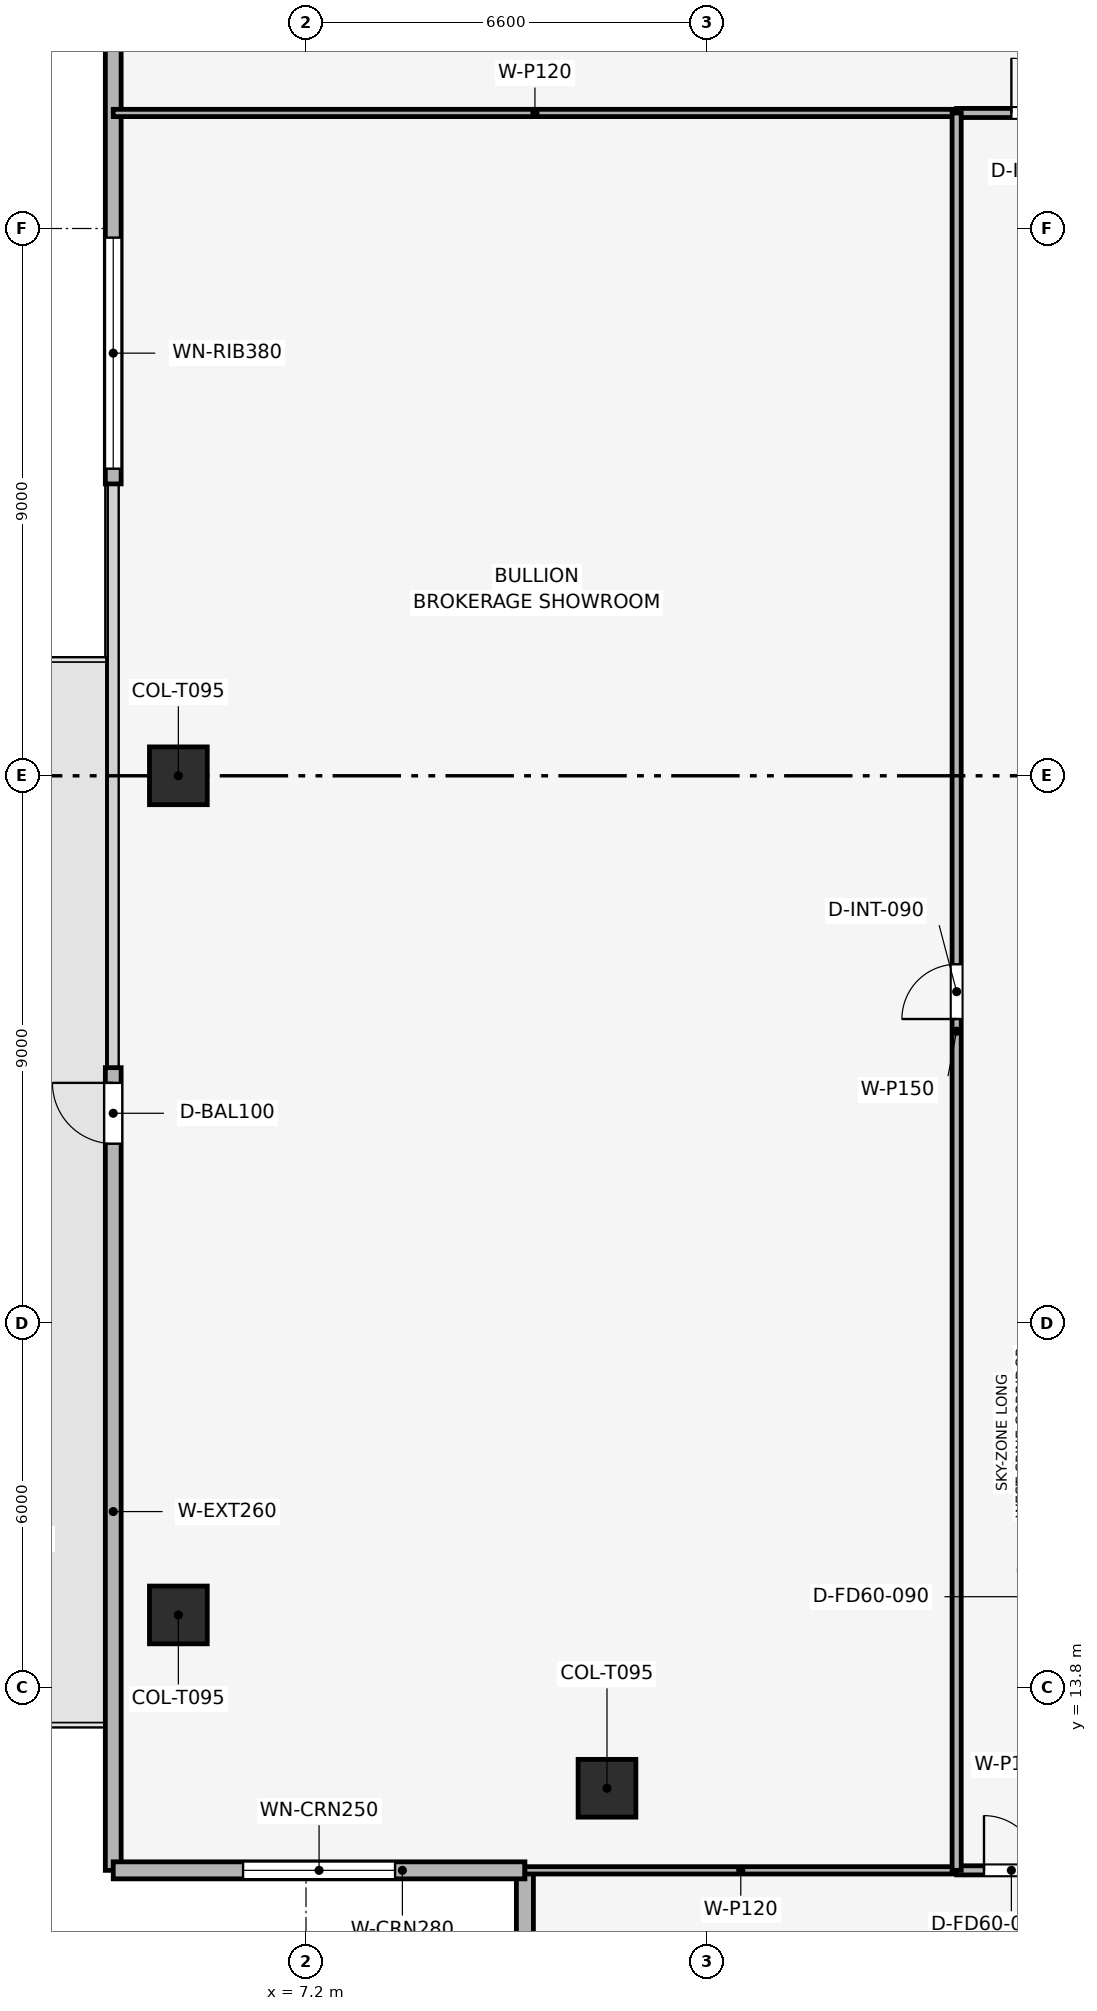
"""IFC4 building model, lengths in metres.
Left out: names, types, materials, properties, quantities, classifications, styles, units other than length and angle.
Written with IfcOpenShell. Run it as: python <this file> out.ifc"""

import sys

from ifc_helpers import new_model, si_unit, direction, frame, frame_2d, origin, origin_2d, place, context, subcontext, project, spatial, rectangle, extrude, element, fill, save


model = new_model("IFC4")
c1 = context("Model", 3, precision=1e-05, world=origin(), true_north=direction((0.0, 1.0)))
c2 = subcontext(c1, "Body", "Model", "MODEL_VIEW")
j1 = project(units=[si_unit("LENGTHUNIT", "METRE"), si_unit("PLANEANGLEUNIT", "RADIAN")], contexts=[c1])
p1 = place(None, origin())
s1 = spatial("IfcSite", under=j1, at=p1, CompositionType="ELEMENT")
p2 = place(p1, origin())
s2 = spatial("IfcBuilding", under=s1, at=p2, CompositionType="ELEMENT")
p3 = place(p2, frame((0.0, 0.0, 280.35)))
s3 = spatial("IfcBuildingStorey", under=s2, at=p3, CompositionType="ELEMENT", Elevation=280.35)
for number, where, z_axis, x_axis in (
    (1, (5.101, 28.8, 0.003), (0.233, 0.0, 0.972), (0.0, 1.0, 0.0)),
    (2, (5.101, 15.0, 0.003), (0.233, 0.0, 0.972), (0.0, 1.0, 0.0)),
):
    element("IfcColumn", number, at=place(p3, frame(where, z_axis=z_axis, x_axis=x_axis)), inside=s3, PredefinedType="COLUMN", context=c2, shape_type="SweptSolid", body=[
        extrude(rectangle(XDim=0.95, YDim=0.95, at=origin_2d()), origin(), (0.0, 0.0, 1.0), 3.48),
    ])
p4 = place(p3, frame((12.15, 12.15, 0.003), z_axis=(0.156204794595, 0.156204794595, 0.975294890939), x_axis=(-0.707106781187, 0.707106781187, 0.0)))
e3 = element("IfcColumn", 3, at=p4, inside=s3, PredefinedType="COLUMN", context=c2, shape_type="SweptSolid", body=[
    extrude(rectangle(XDim=0.95, YDim=0.95, at=origin_2d()), origin(), (0.0, 0.0, 1.0), 3.47),
])
p5 = place(p3, frame((4.03, 10.8, 0.0), z_axis=(0.0, 0.0, 1.0), x_axis=(0.0, 1.0, 0.0)))
e4 = element("IfcWall", 4, at=p5, inside=s3, PredefinedType="SOLIDWALL", context=c2, shape_type="SweptSolid", body=[
    extrude(rectangle(XDim=13.2, YDim=0.26, at=frame_2d((6.6, 0.0))), origin(), (0.0, 0.0, 1.0), 3.39),
])
p6 = place(p5, frame((11.95, 0.0, 0.0)))
e5 = element("IfcOpeningElement", 5, at=p6, cuts=e4, PredefinedType="OPENING", context=c2, shape_type="SweptSolid", body=[
    extrude(rectangle(XDim=1.0, YDim=2.2, at=frame_2d((0.5, 1.1))), frame((0.0, 0.14, 0.0), z_axis=(0.0, -1.0, 0.0), x_axis=(1.0, 0.0, 0.0)), (0.0, 0.0, 1.0), 0.28),
])
p7 = place(p3, frame((4.03, 33.6, 0.0), z_axis=(0.0, 0.0, 1.0), x_axis=(0.0, 1.0, 0.0)))
e6 = element("IfcWall", 6, at=p7, inside=s3, PredefinedType="SOLIDWALL", context=c2, shape_type="SweptSolid", body=[
    extrude(rectangle(XDim=13.2, YDim=0.26, at=frame_2d((6.6, 0.0))), origin(), (0.0, 0.0, 1.0), 3.39),
])
p8 = place(p7, frame((0.25, 0.0, 0.72)))
e7 = element("IfcOpeningElement", 7, at=p8, cuts=e6, PredefinedType="OPENING", context=c2, shape_type="SweptSolid", body=[
    extrude(rectangle(XDim=3.8, YDim=1.9, at=frame_2d((1.9, 0.95))), frame((0.0, 0.14, 0.0), z_axis=(0.0, -1.0, 0.0), x_axis=(1.0, 0.0, 0.0)), (0.0, 0.0, 1.0), 0.28),
])
p9 = place(p3, frame((10.8, 4.03, 0.0), z_axis=(0.0, 0.0, 1.0), x_axis=(0.0, 1.0, 0.0)))
e8 = element("IfcWall", 8, at=p9, inside=s3, PredefinedType="SOLIDWALL", context=c2, shape_type="SweptSolid", body=[
    extrude(rectangle(XDim=6.77, YDim=0.28, at=frame_2d((3.385, 0.0))), origin(), (0.0, 0.0, 1.0), 3.39),
])
p10 = place(p9, frame((2.135, 0.0, 0.72)))
e9 = element("IfcOpeningElement", 9, at=p10, cuts=e8, PredefinedType="OPENING", context=c2, shape_type="SweptSolid", body=[
    extrude(rectangle(XDim=2.5, YDim=1.9, at=frame_2d((1.25, 0.95))), frame((0.0, 0.15, 0.0), z_axis=(0.0, -1.0, 0.0), x_axis=(1.0, 0.0, 0.0)), (0.0, 0.0, 1.0), 0.3),
])
p11 = place(p3, frame((10.8, 10.8, 0.0), z_axis=(0.0, 0.0, 1.0), x_axis=(-1.0, 0.0, 0.0)))
e10 = element("IfcWall", 10, at=p11, inside=s3, PredefinedType="SOLIDWALL", context=c2, shape_type="SweptSolid", body=[
    extrude(rectangle(XDim=6.77, YDim=0.28, at=frame_2d((3.385, 0.0))), origin(), (0.0, 0.0, 1.0), 3.39),
])
p12 = place(p11, frame((2.135, 0.0, 0.72)))
e11 = element("IfcOpeningElement", 11, at=p12, cuts=e10, PredefinedType="OPENING", context=c2, shape_type="SweptSolid", body=[
    extrude(rectangle(XDim=2.5, YDim=1.9, at=frame_2d((1.25, 0.95))), frame((0.0, 0.15, 0.0), z_axis=(0.0, -1.0, 0.0), x_axis=(1.0, 0.0, 0.0)), (0.0, 0.0, 1.0), 0.3),
])
p13 = place(p3, frame((10.8, 10.8, 0.0), z_axis=(0.0, 0.0, 1.0), x_axis=(1.0, 0.0, 0.0)))
e12 = element("IfcWall", 12, at=p13, inside=s3, PredefinedType="PARTITIONING", context=c2, shape_type="SweptSolid", body=[
    extrude(rectangle(XDim=7.1, YDim=0.12, at=frame_2d((3.55, 0.0))), origin(), (0.0, 0.0, 1.0), 2.975),
])
p14 = place(p3, frame((17.9, 10.8, 0.0), z_axis=(0.0, 0.0, 1.0), x_axis=(1.0, 0.0, 0.0)))
e13 = element("IfcWall", 13, at=p14, inside=s3, PredefinedType="PARTITIONING", context=c2, shape_type="SweptSolid", body=[
    extrude(rectangle(XDim=1.9, YDim=0.15, at=frame_2d((0.95, 0.0))), origin(), (0.0, 0.0, 1.0), 3.39),
])
p15 = place(p14, frame((0.45, 0.0, 0.0)))
e14 = element("IfcOpeningElement", 14, at=p15, cuts=e13, PredefinedType="OPENING", context=c2, shape_type="SweptSolid", body=[
    extrude(rectangle(XDim=0.9, YDim=2.1, at=frame_2d((0.45, 1.05))), frame((0.0, 0.085, 0.0), z_axis=(0.0, -1.0, 0.0), x_axis=(1.0, 0.0, 0.0)), (0.0, 0.0, 1.0), 0.17),
])
p16 = place(p3, frame((4.03, 39.7, 0.0), z_axis=(0.0, 0.0, 1.0), x_axis=(1.0, 0.0, 0.0)))
e15 = element("IfcWall", 15, at=p16, inside=s3, PredefinedType="PARTITIONING", context=c2, shape_type="SweptSolid", body=[
    extrude(rectangle(XDim=13.87, YDim=0.12, at=frame_2d((6.935, 0.0))), origin(), (0.0, 0.0, 1.0), 2.975),
])
p17 = place(p3, frame((17.9, 39.7, 0.0), z_axis=(0.0, 0.0, 1.0), x_axis=(1.0, 0.0, 0.0)))
e16 = element("IfcWall", 16, at=p17, inside=s3, PredefinedType="PARTITIONING", context=c2, shape_type="SweptSolid", body=[
    extrude(rectangle(XDim=21.8, YDim=0.15, at=frame_2d((10.9, 0.0))), origin(), (0.0, 0.0, 1.0), 2.975),
])
p18 = place(p17, frame((0.9, 0.0, 0.0)))
e17 = element("IfcOpeningElement", 17, at=p18, cuts=e16, PredefinedType="OPENING", context=c2, shape_type="SweptSolid", body=[
    extrude(rectangle(XDim=0.9, YDim=2.1, at=frame_2d((0.45, 1.05))), frame((0.0, 0.085, 0.0), z_axis=(0.0, -1.0, 0.0), x_axis=(1.0, 0.0, 0.0)), (0.0, 0.0, 1.0), 0.17),
])
p19 = place(p17, frame((3.65, 0.0, 0.0)))
e18 = element("IfcOpeningElement", 18, at=p19, cuts=e16, PredefinedType="OPENING", context=c2, shape_type="SweptSolid", body=[
    extrude(rectangle(XDim=0.9, YDim=2.1, at=frame_2d((0.45, 1.05))), frame((0.0, 0.085, 0.0), z_axis=(0.0, -1.0, 0.0), x_axis=(1.0, 0.0, 0.0)), (0.0, 0.0, 1.0), 0.17),
])
p20 = place(p17, frame((6.55, 0.0, 0.0)))
e19 = element("IfcOpeningElement", 19, at=p20, cuts=e16, PredefinedType="OPENING", context=c2, shape_type="SweptSolid", body=[
    extrude(rectangle(XDim=0.9, YDim=2.1, at=frame_2d((0.45, 1.05))), frame((0.0, 0.085, 0.0), z_axis=(0.0, -1.0, 0.0), x_axis=(1.0, 0.0, 0.0)), (0.0, 0.0, 1.0), 0.17),
])
p21 = place(p17, frame((9.3, 0.0, 0.0)))
e20 = element("IfcOpeningElement", 20, at=p21, cuts=e16, PredefinedType="OPENING", context=c2, shape_type="SweptSolid", body=[
    extrude(rectangle(XDim=0.95, YDim=2.1, at=frame_2d((0.475, 1.05))), frame((0.0, 0.085, 0.0), z_axis=(0.0, -1.0, 0.0), x_axis=(1.0, 0.0, 0.0)), (0.0, 0.0, 1.0), 0.17),
])
p22 = place(p17, frame((16.0, 0.0, 0.0)))
e21 = element("IfcOpeningElement", 21, at=p22, cuts=e16, PredefinedType="OPENING", context=c2, shape_type="SweptSolid", body=[
    extrude(rectangle(XDim=0.9, YDim=2.1, at=frame_2d((0.45, 1.05))), frame((0.0, 0.085, 0.0), z_axis=(0.0, -1.0, 0.0), x_axis=(1.0, 0.0, 0.0)), (0.0, 0.0, 1.0), 0.17),
])
p23 = place(p3, frame((17.9, 10.8, 0.0), z_axis=(0.0, 0.0, 1.0), x_axis=(0.0, 1.0, 0.0)))
e22 = element("IfcWall", 22, at=p23, inside=s3, PredefinedType="PARTITIONING", context=c2, shape_type="SweptSolid", body=[
    extrude(rectangle(XDim=28.9, YDim=0.15, at=frame_2d((14.45, 0.0))), origin(), (0.0, 0.0, 1.0), 2.975),
])
p24 = place(p23, frame((14.0, 0.0, 0.0)))
e23 = element("IfcOpeningElement", 23, at=p24, cuts=e22, PredefinedType="OPENING", context=c2, shape_type="SweptSolid", body=[
    extrude(rectangle(XDim=0.9, YDim=2.1, at=frame_2d((0.45, 1.05))), frame((0.0, 0.085, 0.0), z_axis=(0.0, -1.0, 0.0), x_axis=(1.0, 0.0, 0.0)), (0.0, 0.0, 1.0), 0.17),
])
p25 = place(p6, origin())
e24 = element("IfcDoor", 24, at=p25, inside=s3, OperationType="SINGLE_SWING_RIGHT", PredefinedType="DOOR", context=c2, shape_type="SweptSolid", body=[
    extrude(rectangle(XDim=1.0, YDim=2.2, at=frame_2d((0.5, 1.1))), frame((0.0, 0.025, 0.0), z_axis=(0.0, -1.0, 0.0), x_axis=(1.0, 0.0, 0.0)), (0.0, 0.0, 1.0), 0.05),
])
fill(e5, e24)
p26 = place(p8, origin())
e25 = element("IfcWindow", 25, at=p26, inside=s3, PartitioningType="SINGLE_PANEL", PredefinedType="WINDOW", context=c2, shape_type="SweptSolid", body=[
    extrude(rectangle(XDim=3.8, YDim=1.9, at=frame_2d((1.9, 0.95))), frame((0.0, 0.03, 0.0), z_axis=(0.0, -1.0, 0.0), x_axis=(1.0, 0.0, 0.0)), (0.0, 0.0, 1.0), 0.06),
])
fill(e7, e25)
p27 = place(p12, origin())
e26 = element("IfcWindow", 26, at=p27, inside=s3, PartitioningType="SINGLE_PANEL", PredefinedType="WINDOW", context=c2, shape_type="SweptSolid", body=[
    extrude(rectangle(XDim=2.5, YDim=1.9, at=frame_2d((1.25, 0.95))), frame((0.0, 0.03, 0.0), z_axis=(0.0, -1.0, 0.0), x_axis=(1.0, 0.0, 0.0)), (0.0, 0.0, 1.0), 0.06),
])
fill(e11, e26)
p28 = place(p15, origin())
e27 = element("IfcDoor", 27, at=p28, inside=s3, OperationType="SINGLE_SWING_LEFT", PredefinedType="DOOR", context=c2, shape_type="SweptSolid", body=[
    extrude(rectangle(XDim=0.9, YDim=2.1, at=frame_2d((0.45, 1.05))), frame((0.0, 0.025, 0.0), z_axis=(0.0, -1.0, 0.0), x_axis=(1.0, 0.0, 0.0)), (0.0, 0.0, 1.0), 0.05),
])
fill(e14, e27)
p29 = place(p18, origin())
e28 = element("IfcDoor", 28, at=p29, inside=s3, OperationType="SINGLE_SWING_LEFT", PredefinedType="DOOR", context=c2, shape_type="SweptSolid", body=[
    extrude(rectangle(XDim=0.9, YDim=2.1, at=frame_2d((0.45, 1.05))), frame((0.0, 0.025, 0.0), z_axis=(0.0, -1.0, 0.0), x_axis=(1.0, 0.0, 0.0)), (0.0, 0.0, 1.0), 0.05),
])
fill(e17, e28)
p30 = place(p24, origin())
e29 = element("IfcDoor", 29, at=p30, inside=s3, OperationType="SINGLE_SWING_LEFT", PredefinedType="DOOR", context=c2, shape_type="SweptSolid", body=[
    extrude(rectangle(XDim=0.9, YDim=2.1, at=frame_2d((0.45, 1.05))), frame((0.0, 0.025, 0.0), z_axis=(0.0, -1.0, 0.0), x_axis=(1.0, 0.0, 0.0)), (0.0, 0.0, 1.0), 0.05),
])
fill(e23, e29)
save(model, sys.argv[1])
